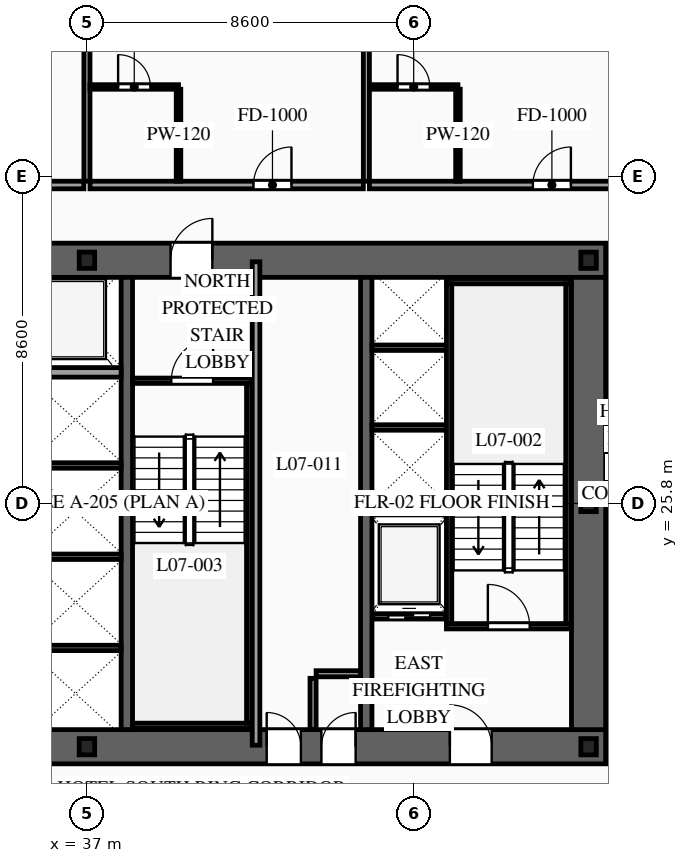
"""IFC4 building model, lengths in metres.
Left out: names, types, materials, properties, quantities, classifications, styles, units other than length and angle.
Written with IfcOpenShell. Run it as: python <this file> out.ifc"""

import sys

from ifc_helpers import new_model, si_unit, direction, frame, frame_2d, origin, origin_2d, place, context, subcontext, project, spatial, rectangle, i_section, extrude, source, transform, mapped, element, fill, save


model = new_model("IFC4")
c1 = context("Model", 3, precision=1e-05, world=origin(), true_north=direction((0.0, 1.0)))
c2 = subcontext(c1, "Body", "Model", "MODEL_VIEW")
j1 = project(units=[si_unit("LENGTHUNIT", "METRE"), si_unit("PLANEANGLEUNIT", "RADIAN")], contexts=[c1])
p1 = place(None, origin())
s1 = spatial("IfcSite", under=j1, at=p1, CompositionType="ELEMENT")
p2 = place(p1, origin())
s2 = spatial("IfcBuilding", under=s1, at=p2, CompositionType="ELEMENT")
p3 = place(p2, frame((0.0, 0.0, 30.6)))
s3 = spatial("IfcBuildingStorey", under=s2, at=p3, CompositionType="ELEMENT", Elevation=30.6)
p4 = place(p3, frame((23.35, 19.4, 0.0), z_axis=(0.0, 0.0, 1.0), x_axis=(1.0, 0.0, 0.0)))
e1 = element("IfcWall", 1, at=p4, inside=s3, PredefinedType="SHEAR", context=c2, shape_type="SweptSolid", body=[
    extrude(rectangle(XDim=27.3, YDim=0.9, at=frame_2d((13.65, 0.0))), origin(), (0.0, 0.0, 1.0), 3.6),
])
p5 = place(p4, frame((2.1, 0.0, 0.0)))
e2 = element("IfcOpeningElement", 2, at=p5, cuts=e1, PredefinedType="OPENING", context=c2, shape_type="SweptSolid", body=[
    extrude(rectangle(XDim=1.1, YDim=2.2, at=frame_2d((0.55, 1.1))), frame((0.0, 0.465, 0.0), z_axis=(0.0, -1.0, 0.0), x_axis=(1.0, 0.0, 0.0)), (0.0, 0.0, 1.0), 0.93),
])
p6 = place(p4, frame((10.0, 0.0, 0.0)))
e3 = element("IfcOpeningElement", 3, at=p6, cuts=e1, PredefinedType="OPENING", context=c2, shape_type="SweptSolid", body=[
    extrude(rectangle(XDim=1.1, YDim=2.2, at=frame_2d((0.55, 1.1))), frame((0.0, 0.465, 0.0), z_axis=(0.0, -1.0, 0.0), x_axis=(1.0, 0.0, 0.0)), (0.0, 0.0, 1.0), 0.93),
])
p7 = place(p4, frame((23.2, 0.0, 0.0)))
e4 = element("IfcOpeningElement", 4, at=p7, cuts=e1, PredefinedType="OPENING", context=c2, shape_type="SweptSolid", body=[
    extrude(rectangle(XDim=1.1, YDim=2.2, at=frame_2d((0.55, 1.1))), frame((0.0, 0.465, 0.0), z_axis=(0.0, -1.0, 0.0), x_axis=(1.0, 0.0, 0.0)), (0.0, 0.0, 1.0), 0.93),
])
p8 = place(p4, frame((19.82, 0.0, 0.0)))
e5 = element("IfcOpeningElement", 5, at=p8, cuts=e1, PredefinedType="OPENING", context=c2, shape_type="SweptSolid", body=[
    extrude(rectangle(XDim=0.9, YDim=2.15, at=frame_2d((0.45, 1.075))), frame((0.0, 0.465, 0.0), z_axis=(0.0, -1.0, 0.0), x_axis=(1.0, 0.0, 0.0)), (0.0, 0.0, 1.0), 0.93),
])
p9 = place(p4, frame((18.38, 0.0, 0.0)))
e6 = element("IfcOpeningElement", 6, at=p9, cuts=e1, PredefinedType="OPENING", context=c2, shape_type="SweptSolid", body=[
    extrude(rectangle(XDim=0.9, YDim=2.15, at=frame_2d((0.45, 1.075))), frame((0.0, 0.465, 0.0), z_axis=(0.0, -1.0, 0.0), x_axis=(1.0, 0.0, 0.0)), (0.0, 0.0, 1.0), 0.93),
])
p10 = place(p3, frame((23.35, 32.2, 0.0), z_axis=(0.0, 0.0, 1.0), x_axis=(1.0, 0.0, 0.0)))
e7 = element("IfcWall", 7, at=p10, inside=s3, PredefinedType="SHEAR", context=c2, shape_type="SweptSolid", body=[
    extrude(rectangle(XDim=27.3, YDim=0.9, at=frame_2d((13.65, 0.0))), origin(), (0.0, 0.0, 1.0), 3.6),
])
p11 = place(p10, frame((4.72, 0.0, 0.0)))
e8 = element("IfcOpeningElement", 8, at=p11, cuts=e7, PredefinedType="OPENING", context=c2, shape_type="SweptSolid", body=[
    extrude(rectangle(XDim=0.9, YDim=2.15, at=frame_2d((0.45, 1.075))), frame((0.0, 0.465, 0.0), z_axis=(0.0, -1.0, 0.0), x_axis=(1.0, 0.0, 0.0)), (0.0, 0.0, 1.0), 0.93),
])
p12 = place(p10, frame((10.0, 0.0, 0.0)))
e9 = element("IfcOpeningElement", 9, at=p12, cuts=e7, PredefinedType="OPENING", context=c2, shape_type="SweptSolid", body=[
    extrude(rectangle(XDim=1.1, YDim=2.2, at=frame_2d((0.55, 1.1))), frame((0.0, 0.465, 0.0), z_axis=(0.0, -1.0, 0.0), x_axis=(1.0, 0.0, 0.0)), (0.0, 0.0, 1.0), 0.93),
])
p13 = place(p10, frame((15.85, 0.0, 0.0)))
e10 = element("IfcOpeningElement", 10, at=p13, cuts=e7, PredefinedType="OPENING", context=c2, shape_type="SweptSolid", body=[
    extrude(rectangle(XDim=1.1, YDim=2.2, at=frame_2d((0.55, 1.1))), frame((0.0, 0.465, 0.0), z_axis=(0.0, -1.0, 0.0), x_axis=(1.0, 0.0, 0.0)), (0.0, 0.0, 1.0), 0.93),
])
m1 = source(origin(), c2, "Body", "SweptSolid", [
    extrude(rectangle(XDim=11.9, YDim=0.9, at=frame_2d((5.95, 0.0))), origin(), (0.0, 0.0, 1.0), 3.6),
])
p14 = place(p3, frame((50.2, 19.85, 0.0), z_axis=(0.0, 0.0, 1.0), x_axis=(0.0, 1.0, 0.0)))
e11 = element("IfcWall", 11, at=p14, inside=s3, PredefinedType="SHEAR", context=c2, shape_type="MappedRepresentation", body=[
    mapped(m1, transform((0.0, 0.0, 0.0), scale=1.0)),
])
m2 = source(origin(), c2, "Body", "SweptSolid", [
    extrude(rectangle(XDim=11.9, YDim=0.3, at=frame_2d((5.95, 0.0))), origin(), (0.0, 0.0, 1.0), 3.6),
])
for number, where, z_axis, x_axis in (
    (12, (38.05, 19.85, 0.0), (0.0, 0.0, 1.0), (0.0, 1.0, 0.0)),
    (13, (44.35, 19.85, 0.0), (0.0, 0.0, 1.0), (0.0, 1.0, 0.0)),
):
    element("IfcWall", number, at=place(p3, frame(where, z_axis=z_axis, x_axis=x_axis)), inside=s3, PredefinedType="SOLIDWALL", context=c2, shape_type="MappedRepresentation", body=[
        mapped(m2, transform((0.0, 0.0, 0.0), scale=1.0)),
    ])
m3 = source(origin(), c2, "Body", "SweptSolid", [
    extrude(i_section(OverallWidth=0.407, OverallDepth=0.428, WebThickness=0.02, FlangeThickness=0.035, at=origin_2d()), origin(), (0.0, 0.0, 1.0), 3.6),
])
for number, where, z_axis, x_axis in (
    (14, (37.0, 19.4, 0.0), (0.0, 0.0, 1.0), (1.0, 0.0, 0.0)),
    (15, (50.2, 19.4, 0.0), (0.0, 0.0, 1.0), (1.0, 0.0, 0.0)),
    (16, (50.2, 25.8, 0.0), (0.0, 0.0, 1.0), (1.0, 0.0, 0.0)),
    (17, (37.0, 32.2, 0.0), (0.0, 0.0, 1.0), (1.0, 0.0, 0.0)),
    (18, (50.2, 32.2, 0.0), (0.0, 0.0, 1.0), (1.0, 0.0, 0.0)),
):
    element("IfcColumn", number, at=place(p3, frame(where, z_axis=z_axis, x_axis=x_axis)), inside=s3, PredefinedType="COLUMN", context=c2, shape_type="MappedRepresentation", body=[
        mapped(m3, transform((0.0, 0.0, 0.0), scale=1.0)),
    ])
p15 = place(p3, frame((44.52, 22.83, 0.0), z_axis=(0.0, 0.0, 1.0), x_axis=(1.0, 0.0, 0.0)))
e19 = element("IfcWall", 19, at=p15, inside=s3, PredefinedType="SOLIDWALL", context=c2, shape_type="SweptSolid", body=[
    extrude(rectangle(XDim=1.92, YDim=0.14, at=frame_2d((0.96, 0.0))), origin(), (0.0, 0.0, 1.0), 3.38),
])
p16 = place(p15, frame((0.41, 0.0, 0.0)))
e20 = element("IfcOpeningElement", 20, at=p16, cuts=e19, PredefinedType="OPENING", context=c2, shape_type="SweptSolid", body=[
    extrude(rectangle(XDim=1.1, YDim=2.2, at=frame_2d((0.55, 1.1))), frame((0.0, 0.085, 0.0), z_axis=(0.0, -1.0, 0.0), x_axis=(1.0, 0.0, 0.0)), (0.0, 0.0, 1.0), 0.17),
])
m4 = source(origin(), c2, "Body", "SweptSolid", [
    extrude(rectangle(XDim=1.92, YDim=0.14, at=frame_2d((0.96, 0.0))), origin(), (0.0, 0.0, 1.0), 3.38),
])
p17 = place(p3, frame((44.52, 25.57, 0.0), z_axis=(0.0, 0.0, 1.0), x_axis=(1.0, 0.0, 0.0)))
e21 = element("IfcWall", 21, at=p17, inside=s3, PredefinedType="SOLIDWALL", context=c2, shape_type="MappedRepresentation", body=[
    mapped(m4, transform((0.0, 0.0, 0.0), scale=1.0)),
])
m5 = source(origin(), c2, "Body", "SweptSolid", [
    extrude(rectangle(XDim=2.4, YDim=0.14, at=frame_2d((1.2, 0.0))), origin(), (0.0, 0.0, 1.0), 3.38),
])
for number, where, z_axis, x_axis in (
    (22, (35.5, 22.0, 0.0), (0.0, 0.0, 1.0), (1.0, 0.0, 0.0)),
    (23, (35.5, 24.4, 0.0), (0.0, 0.0, 1.0), (1.0, 0.0, 0.0)),
    (24, (35.5, 26.8, 0.0), (0.0, 0.0, 1.0), (1.0, 0.0, 0.0)),
):
    element("IfcWall", number, at=place(p3, frame(where, z_axis=z_axis, x_axis=x_axis)), inside=s3, PredefinedType="SOLIDWALL", context=c2, shape_type="MappedRepresentation", body=[
        mapped(m5, transform((0.0, 0.0, 0.0), scale=1.0)),
    ])
m6 = source(origin(), c2, "Body", "SweptSolid", [
    extrude(rectangle(XDim=2.4, YDim=0.25, at=frame_2d((1.2, 0.0))), origin(), (0.0, 0.0, 1.0), 3.38),
])
p18 = place(p3, frame((35.5, 29.25, 0.0), z_axis=(0.0, 0.0, 1.0), x_axis=(1.0, 0.0, 0.0)))
e25 = element("IfcWall", 25, at=p18, inside=s3, PredefinedType="SOLIDWALL", context=c2, shape_type="MappedRepresentation", body=[
    mapped(m6, transform((0.0, 0.0, 0.0), scale=1.0)),
])
m7 = source(origin(), c2, "Body", "SweptSolid", [
    extrude(rectangle(XDim=2.0, YDim=0.14, at=frame_2d((1.0, 0.0))), origin(), (0.0, 0.0, 1.0), 3.38),
])
for number, where, z_axis, x_axis in (
    (26, (44.5, 27.8, 0.0), (0.0, 0.0, 1.0), (1.0, 0.0, 0.0)),
    (27, (44.5, 29.9, 0.0), (0.0, 0.0, 1.0), (1.0, 0.0, 0.0)),
):
    element("IfcWall", number, at=place(p3, frame(where, z_axis=z_axis, x_axis=x_axis)), inside=s3, PredefinedType="SOLIDWALL", context=c2, shape_type="MappedRepresentation", body=[
        mapped(m7, transform((0.0, 0.0, 0.0), scale=1.0)),
    ])
p19 = place(p3, frame((46.46, 22.57, 0.0), z_axis=(0.0, 0.0, 1.0), x_axis=(1.0, 0.0, 0.0)))
e28 = element("IfcWall", 28, at=p19, inside=s3, PredefinedType="SOLIDWALL", context=c2, shape_type="SweptSolid", body=[
    extrude(rectangle(XDim=3.28, YDim=0.14, at=frame_2d((1.64, 0.0))), origin(), (0.0, 0.0, 1.0), 3.38),
])
p20 = place(p19, frame((1.09, 0.0, 0.0)))
e29 = element("IfcOpeningElement", 29, at=p20, cuts=e28, PredefinedType="OPENING", context=c2, shape_type="SweptSolid", body=[
    extrude(rectangle(XDim=1.1, YDim=2.2, at=frame_2d((0.55, 1.1))), frame((0.0, 0.085, 0.0), z_axis=(0.0, -1.0, 0.0), x_axis=(1.0, 0.0, 0.0)), (0.0, 0.0, 1.0), 0.17),
])
m8 = source(origin(), c2, "Body", "SweptSolid", [
    extrude(rectangle(XDim=3.28, YDim=0.14, at=frame_2d((1.64, 0.0))), origin(), (0.0, 0.0, 1.0), 3.38),
])
p21 = place(p3, frame((46.46, 31.65, 0.0), z_axis=(0.0, 0.0, 1.0), x_axis=(1.0, 0.0, 0.0)))
e30 = element("IfcWall", 30, at=p21, inside=s3, PredefinedType="SOLIDWALL", context=c2, shape_type="MappedRepresentation", body=[
    mapped(m8, transform((0.0, 0.0, 0.0), scale=1.0)),
])
m9 = source(origin(), c2, "Body", "SweptSolid", [
    extrude(rectangle(XDim=8.94, YDim=0.14, at=frame_2d((4.47, 0.0))), origin(), (0.0, 0.0, 1.0), 3.38),
])
for number, where, z_axis, x_axis in (
    (31, (46.53, 22.64, 0.0), (0.0, 0.0, 1.0), (0.0, 1.0, 0.0)),
    (32, (49.67, 22.64, 0.0), (0.0, 0.0, 1.0), (0.0, 1.0, 0.0)),
):
    element("IfcWall", number, at=place(p3, frame(where, z_axis=z_axis, x_axis=x_axis)), inside=s3, PredefinedType="SOLIDWALL", context=c2, shape_type="MappedRepresentation", body=[
        mapped(m9, transform((0.0, 0.0, 0.0), scale=1.0)),
    ])
p22 = place(p3, frame((38.2, 29.03, 0.0), z_axis=(0.0, 0.0, 1.0), x_axis=(1.0, 0.0, 0.0)))
e33 = element("IfcWall", 33, at=p22, inside=s3, PredefinedType="SOLIDWALL", context=c2, shape_type="SweptSolid", body=[
    extrude(rectangle(XDim=3.14, YDim=0.14, at=frame_2d((1.57, 0.0))), origin(), (0.0, 0.0, 1.0), 3.38),
])
p23 = place(p22, frame((1.02, 0.0, 0.0)))
e34 = element("IfcOpeningElement", 34, at=p23, cuts=e33, PredefinedType="OPENING", context=c2, shape_type="SweptSolid", body=[
    extrude(rectangle(XDim=1.1, YDim=2.2, at=frame_2d((0.55, 1.1))), frame((0.0, 0.085, 0.0), z_axis=(0.0, -1.0, 0.0), x_axis=(1.0, 0.0, 0.0)), (0.0, 0.0, 1.0), 0.17),
])
m10 = source(origin(), c2, "Body", "SweptSolid", [
    extrude(rectangle(XDim=3.14, YDim=0.14, at=frame_2d((1.57, 0.0))), origin(), (0.0, 0.0, 1.0), 3.38),
])
p24 = place(p3, frame((38.2, 19.95, 0.0), z_axis=(0.0, 0.0, 1.0), x_axis=(1.0, 0.0, 0.0)))
e35 = element("IfcWall", 35, at=p24, inside=s3, PredefinedType="SOLIDWALL", context=c2, shape_type="MappedRepresentation", body=[
    mapped(m10, transform((0.0, 0.0, 0.0), scale=1.0)),
])
m11 = source(origin(), c2, "Body", "SweptSolid", [
    extrude(rectangle(XDim=8.94, YDim=0.14, at=frame_2d((4.47, 0.0))), origin(), (0.0, 0.0, 1.0), 3.38),
])
p25 = place(p3, frame((41.27, 20.02, 0.0), z_axis=(0.0, 0.0, 1.0), x_axis=(0.0, 1.0, 0.0)))
e36 = element("IfcWall", 36, at=p25, inside=s3, PredefinedType="SOLIDWALL", context=c2, shape_type="MappedRepresentation", body=[
    mapped(m11, transform((0.0, 0.0, 0.0), scale=1.0)),
])
m12 = source(origin(), c2, "Body", "SweptSolid", [
    extrude(rectangle(XDim=1.34, YDim=0.16, at=frame_2d((0.67, 0.0))), origin(), (0.0, 0.0, 1.0), 3.38),
])
p26 = place(p3, frame((42.95, 19.86, 0.0), z_axis=(0.0, 0.0, 1.0), x_axis=(0.0, 1.0, 0.0)))
e37 = element("IfcWall", 37, at=p26, inside=s3, PredefinedType="PARTITIONING", context=c2, shape_type="MappedRepresentation", body=[
    mapped(m12, transform((0.0, 0.0, 0.0), scale=1.0)),
])
m13 = source(origin(), c2, "Body", "SweptSolid", [
    extrude(rectangle(XDim=1.17, YDim=0.16, at=frame_2d((0.585, 0.0))), origin(), (0.0, 0.0, 1.0), 3.38),
])
p27 = place(p3, frame((43.03, 21.32, 0.0), z_axis=(0.0, 0.0, 1.0), x_axis=(1.0, 0.0, 0.0)))
e38 = element("IfcWall", 38, at=p27, inside=s3, PredefinedType="PARTITIONING", context=c2, shape_type="MappedRepresentation", body=[
    mapped(m13, transform((0.0, 0.0, 0.0), scale=1.0)),
])
m14 = source(origin(), c2, "Body", "SweptSolid", [
    extrude(rectangle(XDim=12.72, YDim=0.2, at=frame_2d((6.36, 0.0))), origin(), (0.0, 0.0, 1.0), 3.38),
])
p28 = place(p3, frame((41.45, 19.44, 0.0), z_axis=(0.0, 0.0, 1.0), x_axis=(0.0, 1.0, 0.0)))
e39 = element("IfcWall", 39, at=p28, inside=s3, PredefinedType="PARTITIONING", context=c2, shape_type="MappedRepresentation", body=[
    mapped(m14, transform((0.0, 0.0, 0.0), scale=1.0)),
])
p29 = place(p3, frame((29.727, 34.18, 0.0), z_axis=(0.0, 0.0, 1.0), x_axis=(1.0, 0.0, 0.0)))
e40 = element("IfcWall", 40, at=p29, inside=s3, PredefinedType="PARTITIONING", context=c2, shape_type="SweptSolid", body=[
    extrude(rectangle(XDim=7.193, YDim=0.2, at=frame_2d((3.596, 0.0))), origin(), (0.0, 0.0, 1.0), 3.38),
])
p30 = place(p29, frame((4.302, 0.0, 0.0)))
e41 = element("IfcOpeningElement", 41, at=p30, cuts=e40, PredefinedType="OPENING", context=c2, shape_type="SweptSolid", body=[
    extrude(rectangle(XDim=1.0, YDim=2.2, at=frame_2d((0.5, 1.1))), frame((0.0, 0.115, 0.0), z_axis=(0.0, -1.0, 0.0), x_axis=(1.0, 0.0, 0.0)), (0.0, 0.0, 1.0), 0.23),
])
m15 = source(origin(), c2, "Body", "SweptSolid", [
    extrude(rectangle(XDim=16.47, YDim=0.16, at=frame_2d((8.235, 0.0))), origin(), (0.0, 0.0, 1.0), 2.575),
])
p31 = place(p3, frame((37.0, 34.28, 0.0), z_axis=(0.0, 0.0, 1.0), x_axis=(0.0, 1.0, 0.0)))
e42 = element("IfcWall", 42, at=p31, inside=s3, PredefinedType="PARTITIONING", context=c2, shape_type="MappedRepresentation", body=[
    mapped(m15, transform((0.0, 0.0, 0.0), scale=1.0)),
])
p32 = place(p3, frame((37.08, 34.18, 0.0), z_axis=(0.0, 0.0, 1.0), x_axis=(1.0, 0.0, 0.0)))
e43 = element("IfcWall", 43, at=p32, inside=s3, PredefinedType="PARTITIONING", context=c2, shape_type="SweptSolid", body=[
    extrude(rectangle(XDim=7.193, YDim=0.2, at=frame_2d((3.596, 0.0))), origin(), (0.0, 0.0, 1.0), 3.38),
])
p33 = place(p32, frame((4.302, 0.0, 0.0)))
e44 = element("IfcOpeningElement", 44, at=p33, cuts=e43, PredefinedType="OPENING", context=c2, shape_type="SweptSolid", body=[
    extrude(rectangle(XDim=1.0, YDim=2.2, at=frame_2d((0.5, 1.1))), frame((0.0, 0.115, 0.0), z_axis=(0.0, -1.0, 0.0), x_axis=(1.0, 0.0, 0.0)), (0.0, 0.0, 1.0), 0.23),
])
m16 = source(origin(), c2, "Body", "SweptSolid", [
    extrude(rectangle(XDim=16.47, YDim=0.16, at=frame_2d((8.235, 0.0))), origin(), (0.0, 0.0, 1.0), 3.38),
])
p34 = place(p3, frame((44.353, 34.28, 0.0), z_axis=(0.0, 0.0, 1.0), x_axis=(0.0, 1.0, 0.0)))
e45 = element("IfcWall", 45, at=p34, inside=s3, PredefinedType="PARTITIONING", context=c2, shape_type="MappedRepresentation", body=[
    mapped(m16, transform((0.0, 0.0, 0.0), scale=1.0)),
])
p35 = place(p3, frame((37.08, 36.76, 0.0), z_axis=(0.0, 0.0, 1.0), x_axis=(1.0, 0.0, 0.0)))
e46 = element("IfcWall", 46, at=p35, inside=s3, PredefinedType="PARTITIONING", context=c2, shape_type="SweptSolid", body=[
    extrude(rectangle(XDim=2.33, YDim=0.12, at=frame_2d((1.165, 0.0))), origin(), (0.0, 0.0, 1.0), 3.38),
])
p36 = place(p35, frame((0.74, 0.0, 0.0)))
e47 = element("IfcOpeningElement", 47, at=p36, cuts=e46, PredefinedType="OPENING", context=c2, shape_type="SweptSolid", body=[
    extrude(rectangle(XDim=0.85, YDim=2.1, at=frame_2d((0.425, 1.05))), frame((0.0, 0.075, 0.0), z_axis=(0.0, -1.0, 0.0), x_axis=(1.0, 0.0, 0.0)), (0.0, 0.0, 1.0), 0.15),
])
m17 = source(origin(), c2, "Body", "SweptSolid", [
    extrude(rectangle(XDim=2.42, YDim=0.12, at=frame_2d((1.21, 0.0))), origin(), (0.0, 0.0, 1.0), 3.38),
])
p37 = place(p3, frame((39.41, 34.28, 0.0), z_axis=(0.0, 0.0, 1.0), x_axis=(0.0, 1.0, 0.0)))
e48 = element("IfcWall", 48, at=p37, inside=s3, PredefinedType="PARTITIONING", context=c2, shape_type="MappedRepresentation", body=[
    mapped(m17, transform((0.0, 0.0, 0.0), scale=1.0)),
])
p38 = place(p3, frame((44.433, 34.18, 0.0), z_axis=(0.0, 0.0, 1.0), x_axis=(1.0, 0.0, 0.0)))
e49 = element("IfcWall", 49, at=p38, inside=s3, PredefinedType="PARTITIONING", context=c2, shape_type="SweptSolid", body=[
    extrude(rectangle(XDim=7.194, YDim=0.2, at=frame_2d((3.597, 0.0))), origin(), (0.0, 0.0, 1.0), 3.38),
])
p39 = place(p38, frame((4.302, 0.0, 0.0)))
e50 = element("IfcOpeningElement", 50, at=p39, cuts=e49, PredefinedType="OPENING", context=c2, shape_type="SweptSolid", body=[
    extrude(rectangle(XDim=1.0, YDim=2.2, at=frame_2d((0.5, 1.1))), frame((0.0, 0.115, 0.0), z_axis=(0.0, -1.0, 0.0), x_axis=(1.0, 0.0, 0.0)), (0.0, 0.0, 1.0), 0.23),
])
p40 = place(p3, frame((44.433, 36.76, 0.0), z_axis=(0.0, 0.0, 1.0), x_axis=(1.0, 0.0, 0.0)))
e51 = element("IfcWall", 51, at=p40, inside=s3, PredefinedType="PARTITIONING", context=c2, shape_type="SweptSolid", body=[
    extrude(rectangle(XDim=2.33, YDim=0.12, at=frame_2d((1.165, 0.0))), origin(), (0.0, 0.0, 1.0), 3.38),
])
p41 = place(p40, frame((0.74, 0.0, 0.0)))
e52 = element("IfcOpeningElement", 52, at=p41, cuts=e51, PredefinedType="OPENING", context=c2, shape_type="SweptSolid", body=[
    extrude(rectangle(XDim=0.85, YDim=2.1, at=frame_2d((0.425, 1.05))), frame((0.0, 0.075, 0.0), z_axis=(0.0, -1.0, 0.0), x_axis=(1.0, 0.0, 0.0)), (0.0, 0.0, 1.0), 0.15),
])
p42 = place(p3, frame((46.763, 34.28, 0.0), z_axis=(0.0, 0.0, 1.0), x_axis=(0.0, 1.0, 0.0)))
e53 = element("IfcWall", 53, at=p42, inside=s3, PredefinedType="PARTITIONING", context=c2, shape_type="MappedRepresentation", body=[
    mapped(m17, transform((0.0, 0.0, 0.0), scale=1.0)),
])
m18 = source(origin(), c2, "Body", "SweptSolid", [
    extrude(rectangle(XDim=1.1, YDim=2.2, at=frame_2d((0.55, 1.1))), frame((0.0, 0.025, 0.0), z_axis=(0.0, -1.0, 0.0), x_axis=(1.0, 0.0, 0.0)), (0.0, 0.0, 1.0), 0.05),
])
p43 = place(p16, origin())
e54 = element("IfcDoor", 54, at=p43, inside=s3, OperationType="SLIDING_TO_RIGHT", PredefinedType="DOOR", context=c2, shape_type="MappedRepresentation", body=[
    mapped(m18, transform((0.0, 0.0, 0.0), scale=1.0)),
])
fill(e20, e54)
m19 = source(origin(), c2, "Body", "SweptSolid", [
    extrude(rectangle(XDim=1.1, YDim=2.2, at=frame_2d((0.55, 1.1))), frame((0.0, 0.025, 0.0), z_axis=(0.0, -1.0, 0.0), x_axis=(1.0, 0.0, 0.0)), (0.0, 0.0, 1.0), 0.05),
])
p44 = place(p20, origin())
e55 = element("IfcDoor", 55, at=p44, inside=s3, OperationType="SINGLE_SWING_LEFT", PredefinedType="DOOR", context=c2, shape_type="MappedRepresentation", body=[
    mapped(m19, transform((0.0, 0.0, 0.0), scale=1.0)),
])
fill(e29, e55)
p45 = place(p23, origin())
e56 = element("IfcDoor", 56, at=p45, inside=s3, OperationType="SINGLE_SWING_RIGHT", PredefinedType="DOOR", context=c2, shape_type="MappedRepresentation", body=[
    mapped(m19, transform((0.0, 0.0, 0.0), scale=1.0)),
])
fill(e34, e56)
p46 = place(p7, origin())
e57 = element("IfcDoor", 57, at=p46, inside=s3, OperationType="SINGLE_SWING_LEFT", PredefinedType="DOOR", context=c2, shape_type="MappedRepresentation", body=[
    mapped(m19, transform((0.0, 0.0, 0.0), scale=1.0)),
])
fill(e4, e57)
p47 = place(p13, origin())
e58 = element("IfcDoor", 58, at=p47, inside=s3, OperationType="SINGLE_SWING_RIGHT", PredefinedType="DOOR", context=c2, shape_type="MappedRepresentation", body=[
    mapped(m19, transform((0.0, 0.0, 0.0), scale=1.0)),
])
fill(e10, e58)
m20 = source(origin(), c2, "Body", "SweptSolid", [
    extrude(rectangle(XDim=0.9, YDim=2.15, at=frame_2d((0.45, 1.075))), frame((0.0, 0.025, 0.0), z_axis=(0.0, -1.0, 0.0), x_axis=(1.0, 0.0, 0.0)), (0.0, 0.0, 1.0), 0.05),
])
p48 = place(p8, origin())
e59 = element("IfcDoor", 59, at=p48, inside=s3, OperationType="SINGLE_SWING_RIGHT", PredefinedType="DOOR", context=c2, shape_type="MappedRepresentation", body=[
    mapped(m20, transform((0.0, 0.0, 0.0), scale=1.0)),
])
fill(e5, e59)
p49 = place(p9, origin())
e60 = element("IfcDoor", 60, at=p49, inside=s3, OperationType="SINGLE_SWING_LEFT", PredefinedType="DOOR", context=c2, shape_type="MappedRepresentation", body=[
    mapped(m20, transform((0.0, 0.0, 0.0), scale=1.0)),
])
fill(e6, e60)
m21 = source(origin(), c2, "Body", "SweptSolid", [
    extrude(rectangle(XDim=1.0, YDim=2.2, at=frame_2d((0.5, 1.1))), frame((0.0, 0.025, 0.0), z_axis=(0.0, -1.0, 0.0), x_axis=(1.0, 0.0, 0.0)), (0.0, 0.0, 1.0), 0.05),
])
p50 = place(p33, origin())
e61 = element("IfcDoor", 61, at=p50, inside=s3, OperationType="SINGLE_SWING_RIGHT", PredefinedType="DOOR", context=c2, shape_type="MappedRepresentation", body=[
    mapped(m21, transform((0.0, 0.0, 0.0), scale=1.0)),
])
fill(e44, e61)
m22 = source(origin(), c2, "Body", "SweptSolid", [
    extrude(rectangle(XDim=0.85, YDim=2.1, at=frame_2d((0.425, 1.05))), frame((0.0, 0.025, 0.0), z_axis=(0.0, -1.0, 0.0), x_axis=(1.0, 0.0, 0.0)), (0.0, 0.0, 1.0), 0.05),
])
p51 = place(p36, origin())
e62 = element("IfcDoor", 62, at=p51, inside=s3, OperationType="SINGLE_SWING_LEFT", PredefinedType="DOOR", context=c2, shape_type="MappedRepresentation", body=[
    mapped(m22, transform((0.0, 0.0, 0.0), scale=1.0)),
])
fill(e47, e62)
p52 = place(p39, origin())
e63 = element("IfcDoor", 63, at=p52, inside=s3, OperationType="SINGLE_SWING_RIGHT", PredefinedType="DOOR", context=c2, shape_type="MappedRepresentation", body=[
    mapped(m21, transform((0.0, 0.0, 0.0), scale=1.0)),
])
fill(e50, e63)
p53 = place(p41, origin())
e64 = element("IfcDoor", 64, at=p53, inside=s3, OperationType="SINGLE_SWING_LEFT", PredefinedType="DOOR", context=c2, shape_type="MappedRepresentation", body=[
    mapped(m22, transform((0.0, 0.0, 0.0), scale=1.0)),
])
fill(e52, e64)
save(model, sys.argv[1])
